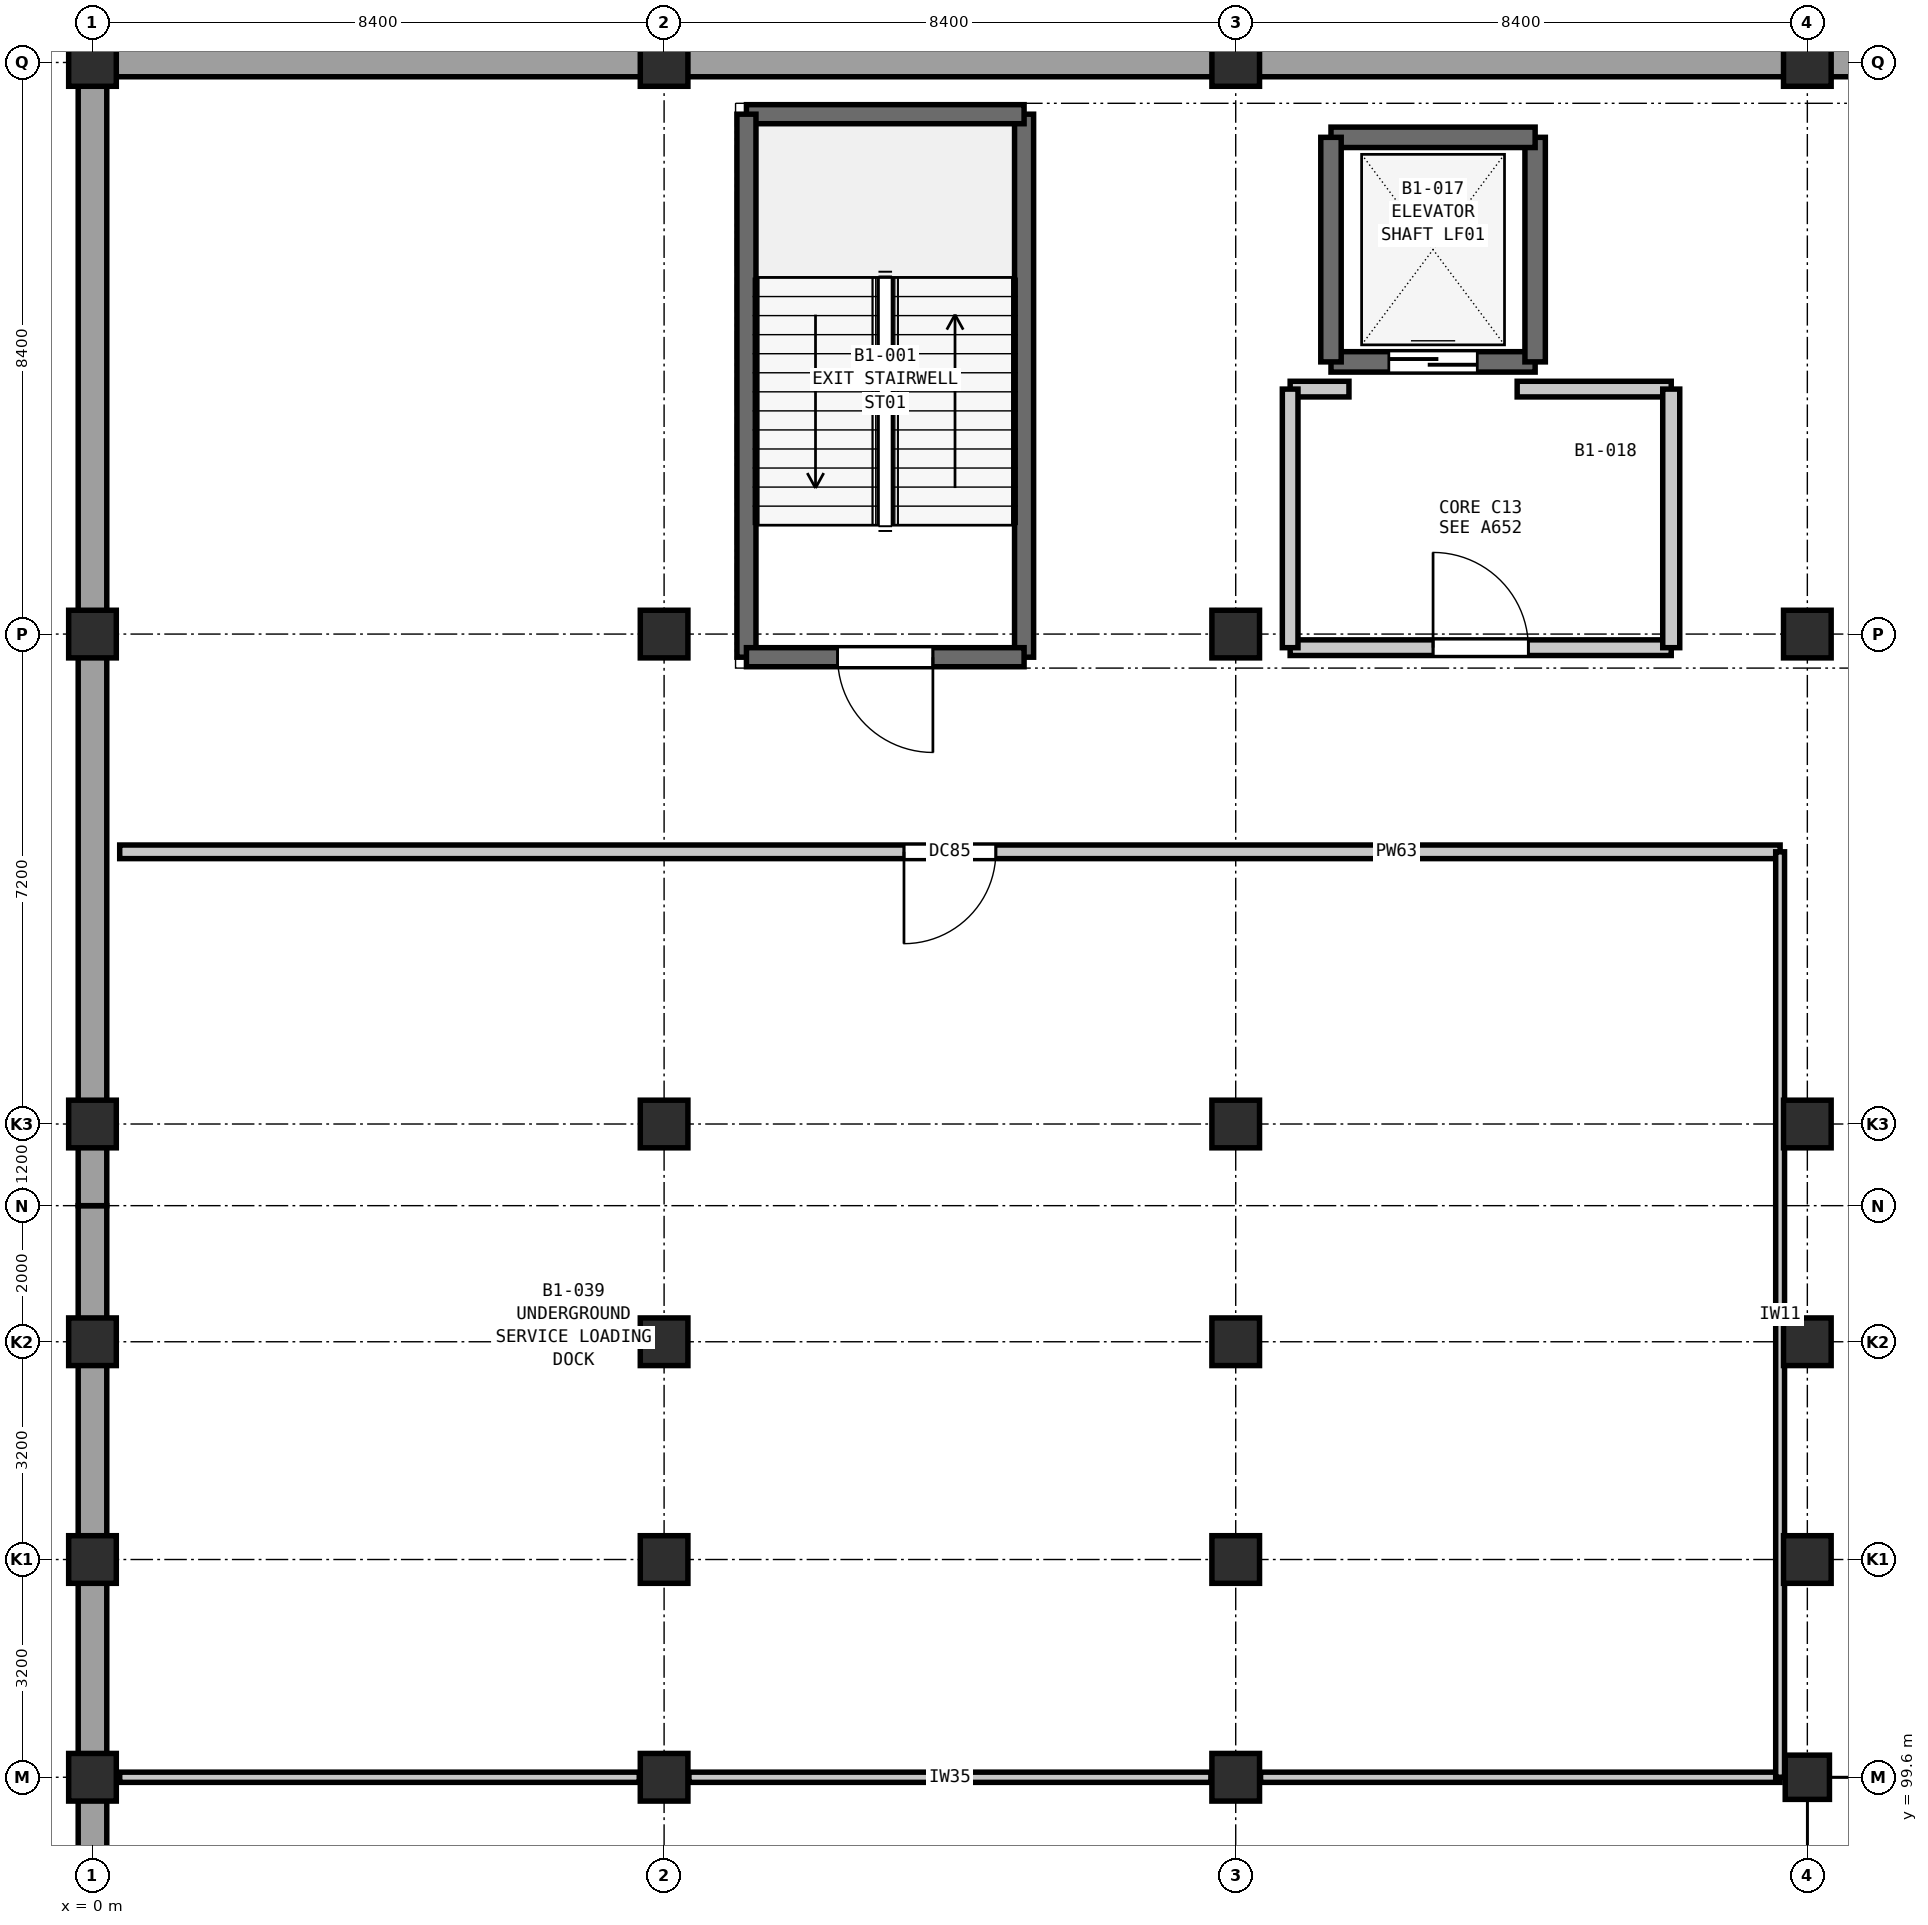
"""IFC4 building model, lengths in metres.
Left out: names, types, materials, properties, quantities, classifications, styles, units other than length and angle.
Written with IfcOpenShell. Run it as: python <this file> out.ifc"""

import sys

from ifc_helpers import new_model, si_unit, direction, frame, frame_2d, origin, origin_2d, place, context, subcontext, project, spatial, rectangle, extrude, element, fill, save


model = new_model("IFC4")
c1 = context("Model", 3, precision=1e-05, world=origin(), true_north=direction((0.0, 1.0)))
c2 = subcontext(c1, "Body", "Model", "MODEL_VIEW")
j1 = project(units=[si_unit("LENGTHUNIT", "METRE"), si_unit("PLANEANGLEUNIT", "RADIAN")], contexts=[c1])
p1 = place(None, origin())
s1 = spatial("IfcSite", under=j1, at=p1, CompositionType="ELEMENT")
p2 = place(p1, origin())
s2 = spatial("IfcBuilding", under=s1, at=p2, CompositionType="ELEMENT")
p3 = place(p2, frame((0.0, 0.0, -4.8)))
s3 = spatial("IfcBuildingStorey", under=s2, at=p3, CompositionType="ELEMENT", Elevation=-4.8)
for number, where, z_axis, x_axis in (
    (1, (0.0, 99.6, 0.0), (0.0, 0.0, 1.0), (1.0, 0.0, 0.0)),
    (2, (0.0, 102.8, 0.0), (0.0, 0.0, 1.0), (1.0, 0.0, 0.0)),
    (3, (0.0, 106.0, 0.0), (0.0, 0.0, 1.0), (1.0, 0.0, 0.0)),
    (4, (0.0, 109.2, 0.0), (0.0, 0.0, 1.0), (1.0, 0.0, 0.0)),
    (5, (0.0, 116.4, 0.0), (0.0, 0.0, 1.0), (1.0, 0.0, 0.0)),
    (6, (0.0, 124.8, 0.0), (0.0, 0.0, 1.0), (1.0, 0.0, 0.0)),
    (7, (8.4, 99.6, 0.0), (0.0, 0.0, 1.0), (1.0, 0.0, 0.0)),
    (8, (8.4, 102.8, 0.0), (0.0, 0.0, 1.0), (1.0, 0.0, 0.0)),
    (9, (8.4, 106.0, 0.0), (0.0, 0.0, 1.0), (1.0, 0.0, 0.0)),
    (10, (8.4, 109.2, 0.0), (0.0, 0.0, 1.0), (1.0, 0.0, 0.0)),
    (11, (8.4, 116.4, 0.0), (0.0, 0.0, 1.0), (1.0, 0.0, 0.0)),
    (12, (8.4, 124.8, 0.0), (0.0, 0.0, 1.0), (1.0, 0.0, 0.0)),
    (13, (16.8, 99.6, 0.0), (0.0, 0.0, 1.0), (1.0, 0.0, 0.0)),
    (14, (16.8, 102.8, 0.0), (0.0, 0.0, 1.0), (1.0, 0.0, 0.0)),
    (15, (16.8, 106.0, 0.0), (0.0, 0.0, 1.0), (1.0, 0.0, 0.0)),
    (16, (16.8, 109.2, 0.0), (0.0, 0.0, 1.0), (1.0, 0.0, 0.0)),
    (17, (16.8, 116.4, 0.0), (0.0, 0.0, 1.0), (1.0, 0.0, 0.0)),
    (18, (16.8, 124.8, 0.0), (0.0, 0.0, 1.0), (1.0, 0.0, 0.0)),
):
    element("IfcColumn", number, at=place(p3, frame(where, z_axis=z_axis, x_axis=x_axis)), inside=s3, PredefinedType="COLUMN", context=c2, shape_type="SweptSolid", body=[
        extrude(rectangle(XDim=0.7, YDim=0.7, at=origin_2d()), origin(), (0.0, 0.0, 1.0), 4.8),
    ])
p4 = place(p3, frame((25.2, 99.6, 0.0), z_axis=(0.0, 0.0, 1.0), x_axis=(1.0, 0.0, 0.0)))
e19 = element("IfcColumn", 19, at=p4, inside=s3, PredefinedType="COLUMN", context=c2, shape_type="SweptSolid", body=[
    extrude(rectangle(XDim=0.65, YDim=0.65, at=origin_2d()), origin(), (0.0, 0.0, 1.0), 4.8),
])
for number, where, z_axis, x_axis in (
    (20, (25.2, 102.8, 0.0), (0.0, 0.0, 1.0), (1.0, 0.0, 0.0)),
    (21, (25.2, 106.0, 0.0), (0.0, 0.0, 1.0), (1.0, 0.0, 0.0)),
    (22, (25.2, 109.2, 0.0), (0.0, 0.0, 1.0), (1.0, 0.0, 0.0)),
    (23, (25.2, 116.4, 0.0), (0.0, 0.0, 1.0), (1.0, 0.0, 0.0)),
    (24, (25.2, 124.8, 0.0), (0.0, 0.0, 1.0), (1.0, 0.0, 0.0)),
):
    element("IfcColumn", number, at=place(p3, frame(where, z_axis=z_axis, x_axis=x_axis)), inside=s3, PredefinedType="COLUMN", context=c2, shape_type="SweptSolid", body=[
        extrude(rectangle(XDim=0.7, YDim=0.7, at=origin_2d()), origin(), (0.0, 0.0, 1.0), 4.8),
    ])
p5 = place(p3, frame((0.0, 91.2, 0.0), z_axis=(0.0, 0.0, 1.0), x_axis=(0.0, 1.0, 0.0)))
e25 = element("IfcWall", 25, at=p5, inside=s3, PredefinedType="SOLIDWALL", context=c2, shape_type="SweptSolid", body=[
    extrude(rectangle(XDim=8.4, YDim=0.42, at=frame_2d((4.2, 0.0))), origin(), (0.0, 0.0, 1.0), 4.05),
])
for number, where, z_axis, x_axis in (
    (26, (0.0, 99.6, 0.0), (0.0, 0.0, 1.0), (0.0, 1.0, 0.0)),
    (27, (0.0, 108.0, 0.0), (0.0, 0.0, 1.0), (0.0, 1.0, 0.0)),
):
    element("IfcWall", number, at=place(p3, frame(where, z_axis=z_axis, x_axis=x_axis)), inside=s3, PredefinedType="SOLIDWALL", context=c2, shape_type="SweptSolid", body=[
        extrude(rectangle(XDim=8.4, YDim=0.42, at=frame_2d((4.2, 0.0))), origin(), (0.0, 0.0, 1.0), 4.05),
    ])
p6 = place(p3, frame((0.0, 116.4, 0.0), z_axis=(0.0, 0.0, 1.0), x_axis=(0.0, 1.0, 0.0)))
e28 = element("IfcWall", 28, at=p6, inside=s3, PredefinedType="SOLIDWALL", context=c2, shape_type="SweptSolid", body=[
    extrude(rectangle(XDim=8.4, YDim=0.42, at=frame_2d((4.2, 0.0))), origin(), (0.0, 0.0, 1.0), 4.05),
])
p7 = place(p3, frame((0.0, 124.8, 0.0), z_axis=(0.0, 0.0, 1.0), x_axis=(1.0, 0.0, 0.0)))
e29 = element("IfcWall", 29, at=p7, inside=s3, PredefinedType="SOLIDWALL", context=c2, shape_type="SweptSolid", body=[
    extrude(rectangle(XDim=8.4, YDim=0.42, at=frame_2d((4.2, 0.0))), origin(), (0.0, 0.0, 1.0), 4.05),
])
p8 = place(p3, frame((8.4, 124.8, 0.0), z_axis=(0.0, 0.0, 1.0), x_axis=(1.0, 0.0, 0.0)))
e30 = element("IfcWall", 30, at=p8, inside=s3, PredefinedType="SOLIDWALL", context=c2, shape_type="SweptSolid", body=[
    extrude(rectangle(XDim=8.4, YDim=0.42, at=frame_2d((4.2, 0.0))), origin(), (0.0, 0.0, 1.0), 4.05),
])
p9 = place(p3, frame((16.8, 124.8, 0.0), z_axis=(0.0, 0.0, 1.0), x_axis=(1.0, 0.0, 0.0)))
e31 = element("IfcWall", 31, at=p9, inside=s3, PredefinedType="SOLIDWALL", context=c2, shape_type="SweptSolid", body=[
    extrude(rectangle(XDim=8.4, YDim=0.42, at=frame_2d((4.2, 0.0))), origin(), (0.0, 0.0, 1.0), 4.05),
])
p10 = place(p3, frame((25.2, 124.8, 0.0), z_axis=(0.0, 0.0, 1.0), x_axis=(1.0, 0.0, 0.0)))
e32 = element("IfcWall", 32, at=p10, inside=s3, PredefinedType="SOLIDWALL", context=c2, shape_type="SweptSolid", body=[
    extrude(rectangle(XDim=8.4, YDim=0.42, at=frame_2d((4.2, 0.0))), origin(), (0.0, 0.0, 1.0), 4.05),
])
p11 = place(p3, frame((13.69, 116.06, 0.0), z_axis=(0.0, 0.0, 1.0), x_axis=(0.0, 1.0, 0.0)))
e33 = element("IfcWall", 33, at=p11, inside=s3, PredefinedType="SHEAR", context=c2, shape_type="SweptSolid", body=[
    extrude(rectangle(XDim=7.98, YDim=0.28, at=frame_2d((3.99, 0.0))), origin(), (0.0, 0.0, 1.0), 4.8),
])
p12 = place(p3, frame((13.69, 124.04, 0.0), z_axis=(0.0, 0.0, 1.0), x_axis=(-1.0, 0.0, 0.0)))
e34 = element("IfcWall", 34, at=p12, inside=s3, PredefinedType="SHEAR", context=c2, shape_type="SweptSolid", body=[
    extrude(rectangle(XDim=4.08, YDim=0.28, at=frame_2d((2.04, 0.0))), origin(), (0.0, 0.0, 1.0), 4.8),
])
p13 = place(p3, frame((9.61, 124.04, 0.0), z_axis=(0.0, 0.0, 1.0), x_axis=(0.0, -1.0, 0.0)))
e35 = element("IfcWall", 35, at=p13, inside=s3, PredefinedType="SHEAR", context=c2, shape_type="SweptSolid", body=[
    extrude(rectangle(XDim=7.98, YDim=0.28, at=frame_2d((3.99, 0.0))), origin(), (0.0, 0.0, 1.0), 4.8),
])
p14 = place(p3, frame((9.61, 116.06, 0.0), z_axis=(0.0, 0.0, 1.0), x_axis=(1.0, 0.0, 0.0)))
e36 = element("IfcWall", 36, at=p14, inside=s3, PredefinedType="SHEAR", context=c2, shape_type="SweptSolid", body=[
    extrude(rectangle(XDim=4.08, YDim=0.28, at=frame_2d((2.04, 0.0))), origin(), (0.0, 0.0, 1.0), 4.8),
])
p15 = place(p14, frame((1.34, 0.0, 0.0)))
e37 = element("IfcOpeningElement", 37, at=p15, cuts=e36, PredefinedType="OPENING", context=c2, shape_type="SweptSolid", body=[
    extrude(rectangle(XDim=1.4, YDim=2.2, at=frame_2d((0.7, 1.1))), frame((0.0, 0.15, 0.0), z_axis=(0.0, -1.0, 0.0), x_axis=(1.0, 0.0, 0.0)), (0.0, 0.0, 1.0), 0.3),
])
p16 = place(p3, frame((18.2, 120.4, 0.0), z_axis=(0.0, 0.0, 1.0), x_axis=(1.0, 0.0, 0.0)))
e38 = element("IfcWall", 38, at=p16, inside=s3, PredefinedType="SHEAR", context=c2, shape_type="SweptSolid", body=[
    extrude(rectangle(XDim=3.0, YDim=0.3, at=frame_2d((1.5, 0.0))), origin(), (0.0, 0.0, 1.0), 4.8),
])
p17 = place(p16, frame((0.85, 0.0, 0.0)))
e39 = element("IfcOpeningElement", 39, at=p17, cuts=e38, PredefinedType="OPENING", context=c2, shape_type="SweptSolid", body=[
    extrude(rectangle(XDim=1.3, YDim=2.2, at=frame_2d((0.65, 1.1))), frame((0.0, 0.16, 0.0), z_axis=(0.0, -1.0, 0.0), x_axis=(1.0, 0.0, 0.0)), (0.0, 0.0, 1.0), 0.32),
])
p18 = place(p3, frame((21.2, 120.4, 0.0), z_axis=(0.0, 0.0, 1.0), x_axis=(0.0, 1.0, 0.0)))
e40 = element("IfcWall", 40, at=p18, inside=s3, PredefinedType="SHEAR", context=c2, shape_type="SweptSolid", body=[
    extrude(rectangle(XDim=3.3, YDim=0.3, at=frame_2d((1.65, 0.0))), origin(), (0.0, 0.0, 1.0), 4.8),
])
p19 = place(p3, frame((21.2, 123.7, 0.0), z_axis=(0.0, 0.0, 1.0), x_axis=(-1.0, 0.0, 0.0)))
e41 = element("IfcWall", 41, at=p19, inside=s3, PredefinedType="SHEAR", context=c2, shape_type="SweptSolid", body=[
    extrude(rectangle(XDim=3.0, YDim=0.3, at=frame_2d((1.5, 0.0))), origin(), (0.0, 0.0, 1.0), 4.8),
])
p20 = place(p3, frame((18.2, 123.7, 0.0), z_axis=(0.0, 0.0, 1.0), x_axis=(0.0, -1.0, 0.0)))
e42 = element("IfcWall", 42, at=p20, inside=s3, PredefinedType="SHEAR", context=c2, shape_type="SweptSolid", body=[
    extrude(rectangle(XDim=3.3, YDim=0.3, at=frame_2d((1.65, 0.0))), origin(), (0.0, 0.0, 1.0), 4.8),
])
p21 = place(p3, frame((8.765, 99.6, 0.0), z_axis=(0.0, 0.0, 1.0), x_axis=(1.0, 0.0, 0.0)))
e43 = element("IfcWall", 43, at=p21, inside=s3, PredefinedType="PARTITIONING", context=c2, shape_type="SweptSolid", body=[
    extrude(rectangle(XDim=7.67, YDim=0.15, at=frame_2d((3.835, 0.0))), origin(), (0.0, 0.0, 1.0), 3.985),
])
for number, where, z_axis, x_axis in (
    (44, (17.165, 99.6, 0.0), (0.0, 0.0, 1.0), (1.0, 0.0, 0.0)),
    (45, (0.4, 99.6, 0.0), (0.0, 0.0, 1.0), (1.0, 0.0, 0.0)),
):
    element("IfcWall", number, at=place(p3, frame(where, z_axis=z_axis, x_axis=x_axis)), inside=s3, PredefinedType="PARTITIONING", context=c2, shape_type="SweptSolid", body=[
        extrude(rectangle(XDim=7.635, YDim=0.15, at=frame_2d((3.817, 0.0))), origin(), (0.0, 0.0, 1.0), 3.985),
    ])
p22 = place(p3, frame((0.4, 113.2, 0.0), z_axis=(0.0, 0.0, 1.0), x_axis=(1.0, 0.0, 0.0)))
e46 = element("IfcWall", 46, at=p22, inside=s3, PredefinedType="PARTITIONING", context=c2, shape_type="SweptSolid", body=[
    extrude(rectangle(XDim=24.4, YDim=0.2, at=frame_2d((12.2, 0.0))), origin(), (0.0, 0.0, 1.0), 4.44),
])
p23 = place(p22, frame((11.525, 0.0, 0.0)))
e47 = element("IfcOpeningElement", 47, at=p23, cuts=e46, PredefinedType="OPENING", context=c2, shape_type="SweptSolid", body=[
    extrude(rectangle(XDim=1.35, YDim=2.2, at=frame_2d((0.675, 1.1))), frame((0.0, 0.11, 0.0), z_axis=(0.0, -1.0, 0.0), x_axis=(1.0, 0.0, 0.0)), (0.0, 0.0, 1.0), 0.22),
])
p24 = place(p3, frame((17.6, 116.2, 0.0), z_axis=(0.0, 0.0, 1.0), x_axis=(1.0, 0.0, 0.0)))
e48 = element("IfcWall", 48, at=p24, inside=s3, PredefinedType="PARTITIONING", context=c2, shape_type="SweptSolid", body=[
    extrude(rectangle(XDim=5.6, YDim=0.23, at=frame_2d((2.8, 0.0))), origin(), (0.0, 0.0, 1.0), 3.985),
])
p25 = place(p24, frame((2.1, 0.0, 0.0)))
e49 = element("IfcOpeningElement", 49, at=p25, cuts=e48, PredefinedType="OPENING", context=c2, shape_type="SweptSolid", body=[
    extrude(rectangle(XDim=1.4, YDim=2.2, at=frame_2d((0.7, 1.1))), frame((0.0, 0.125, 0.0), z_axis=(0.0, -1.0, 0.0), x_axis=(1.0, 0.0, 0.0)), (0.0, 0.0, 1.0), 0.25),
])
p26 = place(p3, frame((20.936, 120.0, 0.0), z_axis=(0.0, 0.0, 1.0), x_axis=(1.0, 0.0, 0.0)))
e50 = element("IfcWall", 50, at=p26, inside=s3, PredefinedType="PARTITIONING", context=c2, shape_type="SweptSolid", body=[
    extrude(rectangle(XDim=2.264, YDim=0.23, at=frame_2d((1.132, 0.0))), origin(), (0.0, 0.0, 1.0), 4.44),
])
p27 = place(p3, frame((17.6, 120.0, 0.0), z_axis=(0.0, 0.0, 1.0), x_axis=(1.0, 0.0, 0.0)))
e51 = element("IfcWall", 51, at=p27, inside=s3, PredefinedType="PARTITIONING", context=c2, shape_type="SweptSolid", body=[
    extrude(rectangle(XDim=0.864, YDim=0.23, at=frame_2d((0.432, 0.0))), origin(), (0.0, 0.0, 1.0), 4.44),
])
p28 = place(p3, frame((17.6, 116.2, 0.0), z_axis=(0.0, 0.0, 1.0), x_axis=(0.0, 1.0, 0.0)))
e52 = element("IfcWall", 52, at=p28, inside=s3, PredefinedType="PARTITIONING", context=c2, shape_type="SweptSolid", body=[
    extrude(rectangle(XDim=3.8, YDim=0.23, at=frame_2d((1.9, 0.0))), origin(), (0.0, 0.0, 1.0), 4.44),
])
p29 = place(p3, frame((23.2, 116.2, 0.0), z_axis=(0.0, 0.0, 1.0), x_axis=(0.0, 1.0, 0.0)))
e53 = element("IfcWall", 53, at=p29, inside=s3, PredefinedType="PARTITIONING", context=c2, shape_type="SweptSolid", body=[
    extrude(rectangle(XDim=3.8, YDim=0.25, at=frame_2d((1.9, 0.0))), origin(), (0.0, 0.0, 1.0), 4.44),
])
p30 = place(p3, frame((24.8, 99.6, 0.0), z_axis=(0.0, 0.0, 1.0), x_axis=(0.0, 1.0, 0.0)))
e54 = element("IfcWall", 54, at=p30, inside=s3, PredefinedType="PARTITIONING", context=c2, shape_type="SweptSolid", body=[
    extrude(rectangle(XDim=13.6, YDim=0.13, at=frame_2d((6.8, 0.0))), origin(), (0.0, 0.0, 1.0), 4.44),
])
p31 = place(p15, frame((1.4, 0.0, 0.0), z_axis=(0.0, 0.0, 1.0), x_axis=(-1.0, 0.0, 0.0)))
e55 = element("IfcDoor", 55, at=p31, inside=s3, OperationType="SINGLE_SWING_LEFT", PredefinedType="DOOR", context=c2, shape_type="SweptSolid", body=[
    extrude(rectangle(XDim=1.4, YDim=2.2, at=frame_2d((0.7, 1.1))), frame((0.0, 0.025, 0.0), z_axis=(0.0, -1.0, 0.0), x_axis=(1.0, 0.0, 0.0)), (0.0, 0.0, 1.0), 0.05),
])
fill(e37, e55)
p32 = place(p17, origin())
e56 = element("IfcDoor", 56, at=p32, inside=s3, OperationType="DOUBLE_DOOR_SLIDING", PredefinedType="DOOR", context=c2, shape_type="SweptSolid", body=[
    extrude(rectangle(XDim=1.3, YDim=2.2, at=frame_2d((0.65, 1.1))), frame((0.0, 0.025, 0.0), z_axis=(0.0, -1.0, 0.0), x_axis=(1.0, 0.0, 0.0)), (0.0, 0.0, 1.0), 0.05),
])
fill(e39, e56)
p33 = place(p23, frame((1.35, 0.0, 0.0), z_axis=(0.0, 0.0, 1.0), x_axis=(-1.0, 0.0, 0.0)))
e57 = element("IfcDoor", 57, at=p33, inside=s3, OperationType="SINGLE_SWING_RIGHT", PredefinedType="DOOR", context=c2, shape_type="SweptSolid", body=[
    extrude(rectangle(XDim=1.35, YDim=2.2, at=frame_2d((0.675, 1.1))), frame((0.0, 0.025, 0.0), z_axis=(0.0, -1.0, 0.0), x_axis=(1.0, 0.0, 0.0)), (0.0, 0.0, 1.0), 0.05),
])
fill(e47, e57)
p34 = place(p25, origin())
e58 = element("IfcDoor", 58, at=p34, inside=s3, OperationType="SINGLE_SWING_LEFT", PredefinedType="DOOR", context=c2, shape_type="SweptSolid", body=[
    extrude(rectangle(XDim=1.4, YDim=2.2, at=frame_2d((0.7, 1.1))), frame((0.0, 0.025, 0.0), z_axis=(0.0, -1.0, 0.0), x_axis=(1.0, 0.0, 0.0)), (0.0, 0.0, 1.0), 0.05),
])
fill(e49, e58)
save(model, sys.argv[1])
